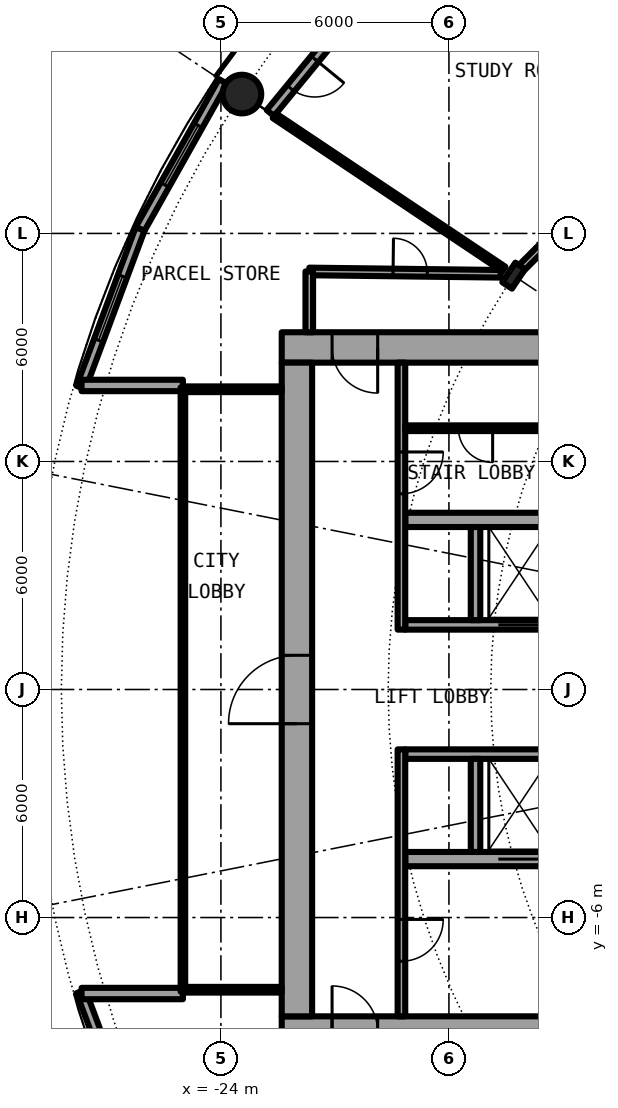
"""IFC4 building model, lengths in metres.
Left out: names, types, materials, properties, quantities, classifications, styles, units other than length and angle.
Written with IfcOpenShell. Run it as: python <this file> out.ifc"""

import sys

from ifc_helpers import new_model, si_unit, direction, frame, frame_2d, origin, origin_2d, place, context, subcontext, project, spatial, rectangle, hollow_circle, i_section, extrude, element, fill, save


model = new_model("IFC4")
c1 = context("Model", 3, precision=1e-05, world=origin(), true_north=direction((0.0, 1.0)))
c2 = subcontext(c1, "Body", "Model", "MODEL_VIEW")
j1 = project(units=[si_unit("LENGTHUNIT", "METRE"), si_unit("PLANEANGLEUNIT", "RADIAN")], contexts=[c1])
p1 = place(None, origin())
s1 = spatial("IfcSite", under=j1, at=p1, CompositionType="ELEMENT")
p2 = place(p1, origin())
s2 = spatial("IfcBuilding", under=s1, at=p2, CompositionType="ELEMENT")
p3 = place(p2, frame((0.0, 0.0, 53.3)))
s3 = spatial("IfcBuildingStorey", under=s2, at=p3, CompositionType="ELEMENT", Elevation=53.3)
p4 = place(p3, frame((-23.448, 15.667, 0.0), z_axis=(0.0, 0.0, 1.0), x_axis=(1.0, 0.0, 0.0)))
e1 = element("IfcColumn", 1, at=p4, inside=s3, PredefinedType="COLUMN", context=c2, shape_type="SweptSolid", body=[
    extrude(hollow_circle(Radius=0.508, WallThickness=0.05, at=origin_2d()), origin(), (0.0, 0.0, 1.0), 4.2),
])
p5 = place(p3, frame((-16.297, 10.889, 0.0), z_axis=(0.0, 0.0, 1.0), x_axis=(-0.831469612303, 0.55557023302, 0.0)))
e2 = element("IfcColumn", 2, at=p5, inside=s3, PredefinedType="COLUMN", context=c2, shape_type="SweptSolid", body=[
    extrude(i_section(OverallWidth=0.305, OverallDepth=0.62, WebThickness=0.021, FlangeThickness=0.04, FilletRadius=0.027, at=origin_2d()), origin(), (0.0, 0.0, 1.0), 4.2),
])
p6 = place(p3, frame((-19.304, 19.304, 0.0), z_axis=(0.0, 0.0, 1.0), x_axis=(-0.634382322723, -0.773019449054, 0.0)))
e3 = element("IfcWall", 3, at=p6, inside=s3, PredefinedType="SOLIDWALL", context=c2, shape_type="SweptSolid", body=[
    extrude(rectangle(XDim=5.352, YDim=0.25, at=frame_2d((2.676, 0.0))), origin(), (0.0, 0.0, 1.0), 3.8),
])
p7 = place(p6, frame((0.841, 0.0, 0.0)))
e4 = element("IfcOpeningElement", 4, at=p7, cuts=e3, PredefinedType="OPENING", context=c2, shape_type="SweptSolid", body=[
    extrude(rectangle(XDim=1.0, YDim=2.2, at=frame_2d((0.5, 1.1))), frame((0.0, 0.135, 0.0), z_axis=(0.0, -1.0, 0.0), x_axis=(1.0, 0.0, 0.0)), (0.0, 0.0, 1.0), 0.27),
])
p8 = place(p6, frame((3.51, 0.0, 0.0)))
e5 = element("IfcOpeningElement", 5, at=p8, cuts=e3, PredefinedType="OPENING", context=c2, shape_type="SweptSolid", body=[
    extrude(rectangle(XDim=1.0, YDim=2.2, at=frame_2d((0.5, 1.1))), frame((0.0, 0.135, 0.0), z_axis=(0.0, -1.0, 0.0), x_axis=(1.0, 0.0, 0.0)), (0.0, 0.0, 1.0), 0.27),
])
p9 = place(p3, frame((-27.682, -7.945, 0.0), z_axis=(0.0, 0.0, 1.0), x_axis=(0.349247811493, -0.937030397675, 0.0)))
e6 = element("IfcWall", 6, at=p9, inside=s3, PredefinedType="SOLIDWALL", context=c2, shape_type="SweptSolid", body=[
    extrude(rectangle(XDim=4.452, YDim=0.25, at=frame_2d((2.226, 0.0))), origin(), (0.0, 0.0, 1.0), 3.8),
])
p10 = place(p9, frame((1.327, 0.0, 0.3)))
e7 = element("IfcOpeningElement", 7, at=p10, cuts=e6, PredefinedType="OPENING", context=c2, shape_type="SweptSolid", body=[
    extrude(rectangle(XDim=1.8, YDim=2.1, at=frame_2d((0.9, 1.05))), frame((0.0, 0.135, 0.0), z_axis=(0.0, -1.0, 0.0), x_axis=(1.0, 0.0, 0.0)), (0.0, 0.0, 1.0), 0.27),
])
p11 = place(p3, frame((-23.946, 16.0, 0.0), z_axis=(0.0, 0.0, 1.0), x_axis=(-0.489696356642, -0.871893042919, 0.0)))
e8 = element("IfcWall", 8, at=p11, inside=s3, PredefinedType="SOLIDWALL", context=c2, shape_type="SweptSolid", body=[
    extrude(rectangle(XDim=4.454, YDim=0.25, at=frame_2d((2.227, 0.0))), origin(), (0.0, 0.0, 1.0), 3.8),
])
p12 = place(p11, frame((1.327, 0.0, 0.3)))
e9 = element("IfcOpeningElement", 9, at=p12, cuts=e8, PredefinedType="OPENING", context=c2, shape_type="SweptSolid", body=[
    extrude(rectangle(XDim=1.8, YDim=2.1, at=frame_2d((0.9, 1.05))), frame((0.0, 0.135, 0.0), z_axis=(0.0, -1.0, 0.0), x_axis=(1.0, 0.0, 0.0)), (0.0, 0.0, 1.0), 0.27),
])
p13 = place(p3, frame((-26.127, 12.117, 0.0), z_axis=(0.0, 0.0, 1.0), x_axis=(-0.349247811493, -0.937030397675, 0.0)))
e10 = element("IfcWall", 10, at=p13, inside=s3, PredefinedType="SOLIDWALL", context=c2, shape_type="SweptSolid", body=[
    extrude(rectangle(XDim=4.452, YDim=0.25, at=frame_2d((2.226, 0.0))), origin(), (0.0, 0.0, 1.0), 3.8),
])
p14 = place(p13, frame((1.327, 0.0, 0.3)))
e11 = element("IfcOpeningElement", 11, at=p14, cuts=e10, PredefinedType="OPENING", context=c2, shape_type="SweptSolid", body=[
    extrude(rectangle(XDim=1.8, YDim=2.1, at=frame_2d((0.9, 1.05))), frame((0.0, 0.135, 0.0), z_axis=(0.0, -1.0, 0.0), x_axis=(1.0, 0.0, 0.0)), (0.0, 0.0, 1.0), 0.27),
])
for number, where, z_axis, x_axis in (
    (12, (-25.0, 8.0, 0.0), (0.0, 0.0, 1.0), (-1.0, 0.0, 0.0)),
    (13, (-25.0, -8.0, 0.0), (0.0, 0.0, 1.0), (-1.0, 0.0, 0.0)),
):
    element("IfcWall", number, at=place(p3, frame(where, z_axis=z_axis, x_axis=x_axis)), inside=s3, PredefinedType="SOLIDWALL", context=c2, shape_type="SweptSolid", body=[
        extrude(rectangle(XDim=2.667, YDim=0.3, at=frame_2d((1.333, 0.0))), origin(), (0.0, 0.0, 1.0), 3.8),
    ])
p15 = place(p3, frame((-22.4, -9.0, 0.0), z_axis=(0.0, 0.0, 1.0), x_axis=(1.0, 0.0, 0.0)))
e14 = element("IfcWall", 14, at=p15, inside=s3, PredefinedType="SHEAR", context=c2, shape_type="SweptSolid", body=[
    extrude(rectangle(XDim=14.2, YDim=0.8, at=frame_2d((7.1, 0.0))), origin(), (0.0, 0.0, 1.0), 4.2),
])
p16 = place(p15, frame((1.325, 0.0, 0.0)))
e15 = element("IfcOpeningElement", 15, at=p16, cuts=e14, PredefinedType="OPENING", context=c2, shape_type="SweptSolid", body=[
    extrude(rectangle(XDim=1.2, YDim=2.3, at=frame_2d((0.6, 1.15))), frame((0.0, 0.41, 0.0), z_axis=(0.0, -1.0, 0.0), x_axis=(1.0, 0.0, 0.0)), (0.0, 0.0, 1.0), 0.82),
])
p17 = place(p3, frame((-8.2, 9.0, 0.0), z_axis=(0.0, 0.0, 1.0), x_axis=(-1.0, 0.0, 0.0)))
e16 = element("IfcWall", 16, at=p17, inside=s3, PredefinedType="SHEAR", context=c2, shape_type="SweptSolid", body=[
    extrude(rectangle(XDim=14.2, YDim=0.8, at=frame_2d((7.1, 0.0))), origin(), (0.0, 0.0, 1.0), 4.2),
])
p18 = place(p17, frame((11.675, 0.0, 0.0)))
e17 = element("IfcOpeningElement", 17, at=p18, cuts=e16, PredefinedType="OPENING", context=c2, shape_type="SweptSolid", body=[
    extrude(rectangle(XDim=1.2, YDim=2.3, at=frame_2d((0.6, 1.15))), frame((0.0, 0.41, 0.0), z_axis=(0.0, -1.0, 0.0), x_axis=(1.0, 0.0, 0.0)), (0.0, 0.0, 1.0), 0.82),
])
p19 = place(p3, frame((-22.0, -8.6, 0.0), z_axis=(0.0, 0.0, 1.0), x_axis=(0.0, 1.0, 0.0)))
e18 = element("IfcWall", 18, at=p19, inside=s3, PredefinedType="SHEAR", context=c2, shape_type="SweptSolid", body=[
    extrude(rectangle(XDim=17.2, YDim=0.8, at=frame_2d((8.6, 0.0))), origin(), (0.0, 0.0, 1.0), 4.2),
])
p20 = place(p19, frame((7.7, 0.0, 0.0)))
e19 = element("IfcOpeningElement", 19, at=p20, cuts=e18, PredefinedType="OPENING", context=c2, shape_type="SweptSolid", body=[
    extrude(rectangle(XDim=1.8, YDim=2.3, at=frame_2d((0.9, 1.15))), frame((0.0, 0.41, 0.0), z_axis=(0.0, -1.0, 0.0), x_axis=(1.0, 0.0, 0.0)), (0.0, 0.0, 1.0), 0.82),
])
p21 = place(p3, frame((-9.0, -1.7, 0.0), z_axis=(0.0, 0.0, 1.0), x_axis=(-1.0, 0.0, 0.0)))
e20 = element("IfcWall", 20, at=p21, inside=s3, PredefinedType="SHEAR", context=c2, shape_type="SweptSolid", body=[
    extrude(rectangle(XDim=10.15, YDim=0.25, at=frame_2d((5.075, 0.0))), origin(), (0.0, 0.0, 1.0), 4.2),
])
p22 = place(p21, frame((0.387, 0.0, 0.0)))
e21 = element("IfcOpeningElement", 21, at=p22, cuts=e20, PredefinedType="OPENING", context=c2, shape_type="SweptSolid", body=[
    extrude(rectangle(XDim=1.1, YDim=2.3, at=frame_2d((0.55, 1.15))), frame((0.0, 0.135, 0.0), z_axis=(0.0, -1.0, 0.0), x_axis=(1.0, 0.0, 0.0)), (0.0, 0.0, 1.0), 0.27),
])
p23 = place(p21, frame((2.45, 0.0, 0.0)))
e22 = element("IfcOpeningElement", 22, at=p23, cuts=e20, PredefinedType="OPENING", context=c2, shape_type="SweptSolid", body=[
    extrude(rectangle(XDim=1.1, YDim=2.3, at=frame_2d((0.55, 1.15))), frame((0.0, 0.135, 0.0), z_axis=(0.0, -1.0, 0.0), x_axis=(1.0, 0.0, 0.0)), (0.0, 0.0, 1.0), 0.27),
])
p24 = place(p21, frame((4.45, 0.0, 0.0)))
e23 = element("IfcOpeningElement", 23, at=p24, cuts=e20, PredefinedType="OPENING", context=c2, shape_type="SweptSolid", body=[
    extrude(rectangle(XDim=1.1, YDim=2.3, at=frame_2d((0.55, 1.15))), frame((0.0, 0.135, 0.0), z_axis=(0.0, -1.0, 0.0), x_axis=(1.0, 0.0, 0.0)), (0.0, 0.0, 1.0), 0.27),
])
p25 = place(p3, frame((-9.0, -4.462, 0.0), z_axis=(0.0, 0.0, 1.0), x_axis=(-1.0, 0.0, 0.0)))
e24 = element("IfcWall", 24, at=p25, inside=s3, PredefinedType="SHEAR", context=c2, shape_type="SweptSolid", body=[
    extrude(rectangle(XDim=10.15, YDim=0.375, at=frame_2d((5.075, 0.0))), origin(), (0.0, 0.0, 1.0), 4.2),
])
p26 = place(p25, frame((6.6, 0.0, 0.0)))
e25 = element("IfcOpeningElement", 25, at=p26, cuts=e24, PredefinedType="OPENING", context=c2, shape_type="SweptSolid", body=[
    extrude(rectangle(XDim=1.1, YDim=2.3, at=frame_2d((0.55, 1.15))), frame((0.0, 0.198, 0.0), z_axis=(0.0, -1.0, 0.0), x_axis=(1.0, 0.0, 0.0)), (0.0, 0.0, 1.0), 0.395),
])
p27 = place(p3, frame((-17.3, -1.825, 0.0), z_axis=(0.0, 0.0, 1.0), x_axis=(0.0, -1.0, 0.0)))
e26 = element("IfcWall", 26, at=p27, inside=s3, PredefinedType="SOLIDWALL", context=c2, shape_type="SweptSolid", body=[
    extrude(rectangle(XDim=2.45, YDim=0.25, at=frame_2d((1.225, 0.0))), origin(), (0.0, 0.0, 1.0), 3.8),
])
p28 = place(p3, frame((-19.25, -1.575, 0.0), z_axis=(0.0, 0.0, 1.0), x_axis=(0.0, -1.0, 0.0)))
e27 = element("IfcWall", 27, at=p28, inside=s3, PredefinedType="SOLIDWALL", context=c2, shape_type="SweptSolid", body=[
    extrude(rectangle(XDim=7.025, YDim=0.2, at=frame_2d((3.513, 0.0))), origin(), (0.0, 0.0, 1.0), 3.8),
])
p29 = place(p28, frame((4.475, 0.0, 0.0)))
e28 = element("IfcOpeningElement", 28, at=p29, cuts=e27, PredefinedType="OPENING", context=c2, shape_type="SweptSolid", body=[
    extrude(rectangle(XDim=1.1, YDim=2.3, at=frame_2d((0.55, 1.15))), frame((0.0, 0.11, 0.0), z_axis=(0.0, -1.0, 0.0), x_axis=(1.0, 0.0, 0.0)), (0.0, 0.0, 1.0), 0.22),
])
p30 = place(p3, frame((-19.15, 1.7, 0.0), z_axis=(0.0, 0.0, 1.0), x_axis=(1.0, 0.0, 0.0)))
e29 = element("IfcWall", 29, at=p30, inside=s3, PredefinedType="SHEAR", context=c2, shape_type="SweptSolid", body=[
    extrude(rectangle(XDim=10.15, YDim=0.25, at=frame_2d((5.075, 0.0))), origin(), (0.0, 0.0, 1.0), 4.2),
])
p31 = place(p30, frame((2.45, 0.0, 0.0)))
e30 = element("IfcOpeningElement", 30, at=p31, cuts=e29, PredefinedType="OPENING", context=c2, shape_type="SweptSolid", body=[
    extrude(rectangle(XDim=1.1, YDim=2.3, at=frame_2d((0.55, 1.15))), frame((0.0, 0.135, 0.0), z_axis=(0.0, -1.0, 0.0), x_axis=(1.0, 0.0, 0.0)), (0.0, 0.0, 1.0), 0.27),
])
p32 = place(p30, frame((8.288, 0.0, 0.0)))
e31 = element("IfcOpeningElement", 31, at=p32, cuts=e29, PredefinedType="OPENING", context=c2, shape_type="SweptSolid", body=[
    extrude(rectangle(XDim=0.9, YDim=2.3, at=frame_2d((0.45, 1.15))), frame((0.0, 0.135, 0.0), z_axis=(0.0, -1.0, 0.0), x_axis=(1.0, 0.0, 0.0)), (0.0, 0.0, 1.0), 0.27),
])
p33 = place(p30, frame((5.275, 0.0, 0.0)))
e32 = element("IfcOpeningElement", 32, at=p33, cuts=e29, PredefinedType="OPENING", context=c2, shape_type="SweptSolid", body=[
    extrude(rectangle(XDim=0.9, YDim=2.3, at=frame_2d((0.45, 1.15))), frame((0.0, 0.135, 0.0), z_axis=(0.0, -1.0, 0.0), x_axis=(1.0, 0.0, 0.0)), (0.0, 0.0, 1.0), 0.27),
])
p34 = place(p3, frame((-9.0, 4.462, 0.0), z_axis=(0.0, 0.0, 1.0), x_axis=(-1.0, 0.0, 0.0)))
e33 = element("IfcWall", 33, at=p34, inside=s3, PredefinedType="SHEAR", context=c2, shape_type="SweptSolid", body=[
    extrude(rectangle(XDim=10.15, YDim=0.375, at=frame_2d((5.075, 0.0))), origin(), (0.0, 0.0, 1.0), 4.2),
])
p35 = place(p3, frame((-17.3, 1.825, 0.0), z_axis=(0.0, 0.0, 1.0), x_axis=(0.0, 1.0, 0.0)))
e34 = element("IfcWall", 34, at=p35, inside=s3, PredefinedType="SOLIDWALL", context=c2, shape_type="SweptSolid", body=[
    extrude(rectangle(XDim=2.45, YDim=0.25, at=frame_2d((1.225, 0.0))), origin(), (0.0, 0.0, 1.0), 3.8),
])
p36 = place(p3, frame((-19.25, 8.6, 0.0), z_axis=(0.0, 0.0, 1.0), x_axis=(0.0, -1.0, 0.0)))
e35 = element("IfcWall", 35, at=p36, inside=s3, PredefinedType="SOLIDWALL", context=c2, shape_type="SweptSolid", body=[
    extrude(rectangle(XDim=7.025, YDim=0.2, at=frame_2d((3.513, 0.0))), origin(), (0.0, 0.0, 1.0), 3.8),
])
p37 = place(p36, frame((2.35, 0.0, 0.0)))
e36 = element("IfcOpeningElement", 36, at=p37, cuts=e35, PredefinedType="OPENING", context=c2, shape_type="SweptSolid", body=[
    extrude(rectangle(XDim=1.1, YDim=2.3, at=frame_2d((0.55, 1.15))), frame((0.0, 0.11, 0.0), z_axis=(0.0, -1.0, 0.0), x_axis=(1.0, 0.0, 0.0)), (0.0, 0.0, 1.0), 0.22),
])
p38 = place(p3, frame((-15.45, 6.875, 0.0), z_axis=(0.0, 0.0, 1.0), x_axis=(-1.0, 0.0, 0.0)))
e37 = element("IfcWall", 37, at=p38, inside=s3, PredefinedType="PARTITIONING", context=c2, shape_type="SweptSolid", body=[
    extrude(rectangle(XDim=3.7, YDim=0.15, at=frame_2d((1.85, 0.0))), origin(), (0.0, 0.0, 1.0), 3.8),
])
p39 = place(p38, frame((1.4, 0.0, 0.0)))
e38 = element("IfcOpeningElement", 38, at=p39, cuts=e37, PredefinedType="OPENING", context=c2, shape_type="SweptSolid", body=[
    extrude(rectangle(XDim=0.9, YDim=2.3, at=frame_2d((0.45, 1.15))), frame((0.0, 0.085, 0.0), z_axis=(0.0, -1.0, 0.0), x_axis=(1.0, 0.0, 0.0)), (0.0, 0.0, 1.0), 0.17),
])
for number, where, z_axis, x_axis in (
    (39, (-22.4, 7.9, 0.0), (0.0, 0.0, 1.0), (-1.0, 0.0, 0.0)),
    (40, (-22.4, -7.9, 0.0), (0.0, 0.0, 1.0), (-1.0, 0.0, 0.0)),
):
    element("IfcWall", number, at=place(p3, frame(where, z_axis=z_axis, x_axis=x_axis)), inside=s3, PredefinedType="PARTITIONING", context=c2, shape_type="SweptSolid", body=[
        extrude(rectangle(XDim=2.54, YDim=0.15, at=frame_2d((1.27, 0.0))), origin(), (0.0, 0.0, 1.0), 3.8),
    ])
p40 = place(p3, frame((-25.0, 7.95, 0.0), z_axis=(0.0, 0.0, 1.0), x_axis=(0.0, -1.0, 0.0)))
e41 = element("IfcWall", 41, at=p40, inside=s3, PredefinedType="PARTITIONING", context=c2, shape_type="SweptSolid", body=[
    extrude(rectangle(XDim=15.9, YDim=0.12, at=frame_2d((7.95, 0.0))), origin(), (0.0, 0.0, 1.0), 3.8),
])
p41 = place(p40, frame((0.95, 0.0, 0.1)))
e42 = element("IfcOpeningElement", 42, at=p41, cuts=e41, PredefinedType="OPENING", context=c2, shape_type="SweptSolid", body=[
    extrude(rectangle(XDim=14.0, YDim=3.0, at=frame_2d((7.0, 1.5))), frame((0.0, 0.07, 0.0), z_axis=(0.0, -1.0, 0.0), x_axis=(1.0, 0.0, 0.0)), (0.0, 0.0, 1.0), 0.14),
])
p42 = place(p3, frame((-22.595, 15.098, 0.0), z_axis=(0.0, 0.0, 1.0), x_axis=(0.831403467378, -0.55566921314, 0.0)))
e43 = element("IfcWall", 43, at=p42, inside=s3, PredefinedType="PARTITIONING", context=c2, shape_type="SweptSolid", body=[
    extrude(rectangle(XDim=7.265, YDim=0.15, at=frame_2d((3.632, 0.0))), origin(), (0.0, 0.0, 1.0), 3.8),
])
p43 = place(p3, frame((-21.675, 11.0, 0.0), z_axis=(0.0, 0.0, 1.0), x_axis=(0.99992425795, -0.012307654658, 0.0)))
e44 = element("IfcWall", 44, at=p43, inside=s3, PredefinedType="PARTITIONING", context=c2, shape_type="SweptSolid", body=[
    extrude(rectangle(XDim=5.039, YDim=0.2, at=frame_2d((2.519, 0.0))), origin(), (0.0, 0.0, 1.0), 3.8),
])
p44 = place(p43, frame((2.205, 0.0, 0.0)))
e45 = element("IfcOpeningElement", 45, at=p44, cuts=e44, PredefinedType="OPENING", context=c2, shape_type="SweptSolid", body=[
    extrude(rectangle(XDim=0.9, YDim=2.3, at=frame_2d((0.45, 1.15))), frame((0.0, 0.11, 0.0), z_axis=(0.0, -1.0, 0.0), x_axis=(1.0, 0.0, 0.0)), (0.0, 0.0, 1.0), 0.22),
])
p45 = place(p3, frame((-16.187, 10.999, 0.0), z_axis=(0.0, 0.0, 1.0), x_axis=(0.707106781187, 0.707106781187, 0.0)))
e46 = element("IfcWall", 46, at=p45, inside=s3, PredefinedType="PARTITIONING", context=c2, shape_type="SweptSolid", body=[
    extrude(rectangle(XDim=7.337, YDim=0.2, at=frame_2d((3.668, 0.0))), origin(), (0.0, 0.0, 1.0), 3.48),
])
p46 = place(p45, frame((3.168, 0.0, 0.0)))
e47 = element("IfcOpeningElement", 47, at=p46, cuts=e46, PredefinedType="OPENING", context=c2, shape_type="SweptSolid", body=[
    extrude(rectangle(XDim=1.0, YDim=2.3, at=frame_2d((0.5, 1.15))), frame((0.0, 0.11, 0.0), z_axis=(0.0, -1.0, 0.0), x_axis=(1.0, 0.0, 0.0)), (0.0, 0.0, 1.0), 0.22),
])
p47 = place(p3, frame((-21.675, 9.4, 0.0), z_axis=(0.0, 0.0, 1.0), x_axis=(0.0, 1.0, 0.0)))
e48 = element("IfcWall", 48, at=p47, inside=s3, PredefinedType="PARTITIONING", context=c2, shape_type="SweptSolid", body=[
    extrude(rectangle(XDim=1.6, YDim=0.2, at=frame_2d((0.8, 0.0))), origin(), (0.0, 0.0, 1.0), 3.8),
])
p48 = place(p8, origin())
e49 = element("IfcDoor", 49, at=p48, inside=s3, OperationType="SINGLE_SWING_LEFT", PredefinedType="DOOR", context=c2, shape_type="SweptSolid", body=[
    extrude(rectangle(XDim=1.0, YDim=2.2, at=frame_2d((0.5, 1.1))), frame((0.0, 0.025, 0.0), z_axis=(0.0, -1.0, 0.0), x_axis=(1.0, 0.0, 0.0)), (0.0, 0.0, 1.0), 0.05),
])
fill(e5, e49)
p49 = place(p12, origin())
e50 = element("IfcWindow", 50, at=p49, inside=s3, PartitioningType="SINGLE_PANEL", PredefinedType="WINDOW", context=c2, shape_type="SweptSolid", body=[
    extrude(rectangle(XDim=1.8, YDim=2.1, at=frame_2d((0.9, 1.05))), frame((0.0, 0.03, 0.0), z_axis=(0.0, -1.0, 0.0), x_axis=(1.0, 0.0, 0.0)), (0.0, 0.0, 1.0), 0.06),
])
fill(e9, e50)
p50 = place(p14, origin())
e51 = element("IfcWindow", 51, at=p50, inside=s3, PartitioningType="SINGLE_PANEL", PredefinedType="WINDOW", context=c2, shape_type="SweptSolid", body=[
    extrude(rectangle(XDim=1.8, YDim=2.1, at=frame_2d((0.9, 1.05))), frame((0.0, 0.03, 0.0), z_axis=(0.0, -1.0, 0.0), x_axis=(1.0, 0.0, 0.0)), (0.0, 0.0, 1.0), 0.06),
])
fill(e11, e51)
p51 = place(p26, origin())
e52 = element("IfcDoor", 52, at=p51, inside=s3, OperationType="DOUBLE_DOOR_SLIDING", PredefinedType="DOOR", context=c2, shape_type="SweptSolid", body=[
    extrude(rectangle(XDim=1.1, YDim=2.3, at=frame_2d((0.55, 1.15))), frame((0.0, 0.025, 0.0), z_axis=(0.0, -1.0, 0.0), x_axis=(1.0, 0.0, 0.0)), (0.0, 0.0, 1.0), 0.05),
])
fill(e25, e52)
p52 = place(p31, origin())
e53 = element("IfcDoor", 53, at=p52, inside=s3, OperationType="DOUBLE_DOOR_SLIDING", PredefinedType="DOOR", context=c2, shape_type="SweptSolid", body=[
    extrude(rectangle(XDim=1.1, YDim=2.3, at=frame_2d((0.55, 1.15))), frame((0.0, 0.025, 0.0), z_axis=(0.0, -1.0, 0.0), x_axis=(1.0, 0.0, 0.0)), (0.0, 0.0, 1.0), 0.05),
])
fill(e30, e53)
p53 = place(p39, origin())
e54 = element("IfcDoor", 54, at=p53, inside=s3, OperationType="SINGLE_SWING_LEFT", PredefinedType="DOOR", context=c2, shape_type="SweptSolid", body=[
    extrude(rectangle(XDim=0.9, YDim=2.3, at=frame_2d((0.45, 1.15))), frame((0.0, 0.025, 0.0), z_axis=(0.0, -1.0, 0.0), x_axis=(1.0, 0.0, 0.0)), (0.0, 0.0, 1.0), 0.05),
])
fill(e38, e54)
p54 = place(p29, origin())
e55 = element("IfcDoor", 55, at=p54, inside=s3, OperationType="SINGLE_SWING_LEFT", PredefinedType="DOOR", context=c2, shape_type="SweptSolid", body=[
    extrude(rectangle(XDim=1.1, YDim=2.3, at=frame_2d((0.55, 1.15))), frame((0.0, 0.025, 0.0), z_axis=(0.0, -1.0, 0.0), x_axis=(1.0, 0.0, 0.0)), (0.0, 0.0, 1.0), 0.05),
])
fill(e28, e55)
p55 = place(p37, origin())
e56 = element("IfcDoor", 56, at=p55, inside=s3, OperationType="SINGLE_SWING_RIGHT", PredefinedType="DOOR", context=c2, shape_type="SweptSolid", body=[
    extrude(rectangle(XDim=1.1, YDim=2.3, at=frame_2d((0.55, 1.15))), frame((0.0, 0.025, 0.0), z_axis=(0.0, -1.0, 0.0), x_axis=(1.0, 0.0, 0.0)), (0.0, 0.0, 1.0), 0.05),
])
fill(e36, e56)
p56 = place(p18, origin())
e57 = element("IfcDoor", 57, at=p56, inside=s3, OperationType="SINGLE_SWING_LEFT", PredefinedType="DOOR", context=c2, shape_type="SweptSolid", body=[
    extrude(rectangle(XDim=1.2, YDim=2.3, at=frame_2d((0.6, 1.15))), frame((0.0, 0.025, 0.0), z_axis=(0.0, -1.0, 0.0), x_axis=(1.0, 0.0, 0.0)), (0.0, 0.0, 1.0), 0.05),
])
fill(e17, e57)
p57 = place(p20, origin())
e58 = element("IfcDoor", 58, at=p57, inside=s3, OperationType="SINGLE_SWING_LEFT", PredefinedType="DOOR", context=c2, shape_type="SweptSolid", body=[
    extrude(rectangle(XDim=1.8, YDim=2.3, at=frame_2d((0.9, 1.15))), frame((0.0, 0.025, 0.0), z_axis=(0.0, -1.0, 0.0), x_axis=(1.0, 0.0, 0.0)), (0.0, 0.0, 1.0), 0.05),
])
fill(e19, e58)
p58 = place(p41, origin())
e59 = element("IfcWindow", 59, at=p58, inside=s3, PartitioningType="SINGLE_PANEL", PredefinedType="WINDOW", context=c2, shape_type="SweptSolid", body=[
    extrude(rectangle(XDim=14.0, YDim=3.0, at=frame_2d((7.0, 1.5))), frame((0.0, 0.03, 0.0), z_axis=(0.0, -1.0, 0.0), x_axis=(1.0, 0.0, 0.0)), (0.0, 0.0, 1.0), 0.06),
])
fill(e42, e59)
p59 = place(p44, origin())
e60 = element("IfcDoor", 60, at=p59, inside=s3, OperationType="SINGLE_SWING_RIGHT", PredefinedType="DOOR", context=c2, shape_type="SweptSolid", body=[
    extrude(rectangle(XDim=0.9, YDim=2.3, at=frame_2d((0.45, 1.15))), frame((0.0, 0.025, 0.0), z_axis=(0.0, -1.0, 0.0), x_axis=(1.0, 0.0, 0.0)), (0.0, 0.0, 1.0), 0.05),
])
fill(e45, e60)
save(model, sys.argv[1])
